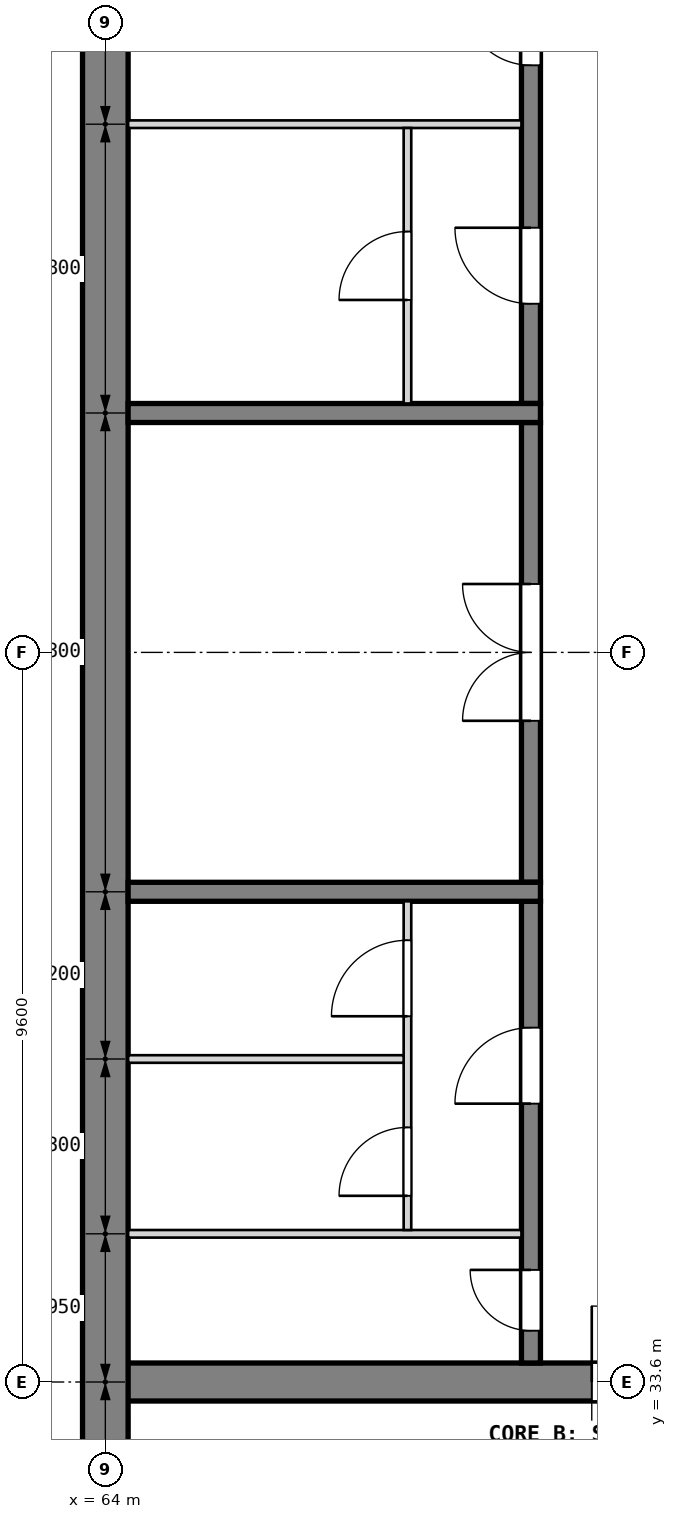
"""IFC4 building model, lengths in metres.
Left out: names, types, materials, properties, quantities, classifications, styles, units other than length and angle.
Written with IfcOpenShell. Run it as: python <this file> out.ifc"""

import sys

from ifc_helpers import new_model, si_unit, direction, frame, frame_2d, origin, place, context, subcontext, project, spatial, rectangle, extrude, element, fill, save


model = new_model("IFC4")
c1 = context("Model", 3, precision=1e-05, world=origin(), true_north=direction((0.0, 1.0)))
c2 = subcontext(c1, "Body", "Model", "MODEL_VIEW")
j1 = project(units=[si_unit("LENGTHUNIT", "METRE"), si_unit("PLANEANGLEUNIT", "RADIAN")], contexts=[c1])
p1 = place(None, origin())
s1 = spatial("IfcSite", under=j1, at=p1, CompositionType="ELEMENT")
p2 = place(p1, origin())
s2 = spatial("IfcBuilding", under=s1, at=p2, CompositionType="ELEMENT")
p3 = place(p2, frame((0.0, 0.0, 4.2)))
s3 = spatial("IfcBuildingStorey", under=s2, at=p3, CompositionType="ELEMENT", Elevation=4.2)
p4 = place(p3, frame((63.75, 33.6, 0.0), z_axis=(0.0, 0.0, 1.0), x_axis=(1.0, 0.0, 0.0)))
e1 = element("IfcWall", 1, at=p4, inside=s3, PredefinedType="SHEAR", context=c2, shape_type="SweptSolid", body=[
    extrude(rectangle(XDim=13.3, YDim=0.5, at=frame_2d((6.65, 0.0))), origin(), (0.0, 0.0, 1.0), 4.2),
])
p5 = place(p4, frame((6.65, 0.0, 0.0)))
e2 = element("IfcOpeningElement", 2, at=p5, cuts=e1, PredefinedType="OPENING", context=c2, shape_type="SweptSolid", body=[
    extrude(rectangle(XDim=2.0, YDim=2.1, at=frame_2d((1.0, 1.05))), frame((0.0, 0.26, 0.0), z_axis=(0.0, -1.0, 0.0), x_axis=(1.0, 0.0, 0.0)), (0.0, 0.0, 1.0), 0.52),
])
p6 = place(p3, frame((64.0, 28.8, 0.0), z_axis=(0.0, 0.0, 1.0), x_axis=(0.0, 1.0, 0.0)))
e3 = element("IfcWall", 3, at=p6, inside=s3, PredefinedType="SHEAR", context=c2, shape_type="SweptSolid", body=[
    extrude(rectangle(XDim=28.8, YDim=0.6, at=frame_2d((14.4, 0.0))), origin(), (0.0, 0.0, 1.0), 4.2),
])
p7 = place(p3, frame((69.6, 33.85, 0.0), z_axis=(0.0, 0.0, 1.0), x_axis=(0.0, 1.0, 0.0)))
e4 = element("IfcWall", 4, at=p7, inside=s3, PredefinedType="SOLIDWALL", context=c2, shape_type="SweptSolid", body=[
    extrude(rectangle(XDim=6.075, YDim=0.25, at=frame_2d((3.038, 0.0))), origin(), (0.0, 0.0, 1.0), 3.9),
])
p8 = place(p7, frame((0.425, 0.0, 0.0)))
e5 = element("IfcOpeningElement", 5, at=p8, cuts=e4, PredefinedType="OPENING", context=c2, shape_type="SweptSolid", body=[
    extrude(rectangle(XDim=0.8, YDim=2.1, at=frame_2d((0.4, 1.05))), frame((0.0, 0.135, 0.0), z_axis=(0.0, -1.0, 0.0), x_axis=(1.0, 0.0, 0.0)), (0.0, 0.0, 1.0), 0.27),
])
p9 = place(p7, frame((3.413, 0.0, 0.0)))
e6 = element("IfcOpeningElement", 6, at=p9, cuts=e4, PredefinedType="OPENING", context=c2, shape_type="SweptSolid", body=[
    extrude(rectangle(XDim=1.0, YDim=2.1, at=frame_2d((0.5, 1.05))), frame((0.0, 0.135, 0.0), z_axis=(0.0, -1.0, 0.0), x_axis=(1.0, 0.0, 0.0)), (0.0, 0.0, 1.0), 0.27),
])
p10 = place(p3, frame((69.6, 40.175, 0.0), z_axis=(0.0, 0.0, 1.0), x_axis=(0.0, 1.0, 0.0)))
e7 = element("IfcWall", 7, at=p10, inside=s3, PredefinedType="SOLIDWALL", context=c2, shape_type="SweptSolid", body=[
    extrude(rectangle(XDim=6.05, YDim=0.25, at=frame_2d((3.025, 0.0))), origin(), (0.0, 0.0, 1.0), 3.9),
])
p11 = place(p10, frame((2.125, 0.0, 0.0)))
e8 = element("IfcOpeningElement", 8, at=p11, cuts=e7, PredefinedType="OPENING", context=c2, shape_type="SweptSolid", body=[
    extrude(rectangle(XDim=1.8, YDim=2.1, at=frame_2d((0.9, 1.05))), frame((0.0, 0.135, 0.0), z_axis=(0.0, -1.0, 0.0), x_axis=(1.0, 0.0, 0.0)), (0.0, 0.0, 1.0), 0.27),
])
p12 = place(p3, frame((69.6, 46.475, 0.0), z_axis=(0.0, 0.0, 1.0), x_axis=(0.0, 1.0, 0.0)))
e9 = element("IfcWall", 9, at=p12, inside=s3, PredefinedType="SOLIDWALL", context=c2, shape_type="SweptSolid", body=[
    extrude(rectangle(XDim=6.075, YDim=0.25, at=frame_2d((3.038, 0.0))), origin(), (0.0, 0.0, 1.0), 3.9),
])
p13 = place(p12, frame((1.312, 0.0, 0.0)))
e10 = element("IfcOpeningElement", 10, at=p13, cuts=e9, PredefinedType="OPENING", context=c2, shape_type="SweptSolid", body=[
    extrude(rectangle(XDim=1.0, YDim=2.1, at=frame_2d((0.5, 1.05))), frame((0.0, 0.135, 0.0), z_axis=(0.0, -1.0, 0.0), x_axis=(1.0, 0.0, 0.0)), (0.0, 0.0, 1.0), 0.27),
])
p14 = place(p12, frame((4.45, 0.0, 0.0)))
e11 = element("IfcOpeningElement", 11, at=p14, cuts=e9, PredefinedType="OPENING", context=c2, shape_type="SweptSolid", body=[
    extrude(rectangle(XDim=0.9, YDim=2.1, at=frame_2d((0.45, 1.05))), frame((0.0, 0.135, 0.0), z_axis=(0.0, -1.0, 0.0), x_axis=(1.0, 0.0, 0.0)), (0.0, 0.0, 1.0), 0.27),
])
for number, where, z_axis, x_axis in (
    (12, (69.725, 40.05, 0.0), (0.0, 0.0, 1.0), (-1.0, 0.0, 0.0)),
    (13, (69.725, 46.35, 0.0), (0.0, 0.0, 1.0), (-1.0, 0.0, 0.0)),
):
    element("IfcWall", number, at=place(p3, frame(where, z_axis=z_axis, x_axis=x_axis)), inside=s3, PredefinedType="SOLIDWALL", context=c2, shape_type="SweptSolid", body=[
        extrude(rectangle(XDim=5.425, YDim=0.25, at=frame_2d((2.712, 0.0))), origin(), (0.0, 0.0, 1.0), 3.9),
    ])
p15 = place(p3, frame((69.475, 35.55, 0.0), z_axis=(0.0, 0.0, 1.0), x_axis=(-1.0, 0.0, 0.0)))
e14 = element("IfcWall", 14, at=p15, inside=s3, PredefinedType="PARTITIONING", context=c2, shape_type="SweptSolid", body=[
    extrude(rectangle(XDim=5.175, YDim=0.1, at=frame_2d((2.587, 0.0))), origin(), (0.0, 0.0, 1.0), 3.9),
])
p16 = place(p3, frame((67.975, 35.6, 0.0), z_axis=(0.0, 0.0, 1.0), x_axis=(0.0, 1.0, 0.0)))
e15 = element("IfcWall", 15, at=p16, inside=s3, PredefinedType="PARTITIONING", context=c2, shape_type="SweptSolid", body=[
    extrude(rectangle(XDim=4.325, YDim=0.1, at=frame_2d((2.163, 0.0))), origin(), (0.0, 0.0, 1.0), 3.9),
])
p17 = place(p16, frame((0.45, 0.0, 0.0)))
e16 = element("IfcOpeningElement", 16, at=p17, cuts=e15, PredefinedType="OPENING", context=c2, shape_type="SweptSolid", body=[
    extrude(rectangle(XDim=0.9, YDim=2.1, at=frame_2d((0.45, 1.05))), frame((0.0, 0.06, 0.0), z_axis=(0.0, -1.0, 0.0), x_axis=(1.0, 0.0, 0.0)), (0.0, 0.0, 1.0), 0.12),
])
p18 = place(p16, frame((2.812, 0.0, 0.0)))
e17 = element("IfcOpeningElement", 17, at=p18, cuts=e15, PredefinedType="OPENING", context=c2, shape_type="SweptSolid", body=[
    extrude(rectangle(XDim=1.0, YDim=2.1, at=frame_2d((0.5, 1.05))), frame((0.0, 0.06, 0.0), z_axis=(0.0, -1.0, 0.0), x_axis=(1.0, 0.0, 0.0)), (0.0, 0.0, 1.0), 0.12),
])
p19 = place(p3, frame((67.925, 37.85, 0.0), z_axis=(0.0, 0.0, 1.0), x_axis=(-1.0, 0.0, 0.0)))
e18 = element("IfcWall", 18, at=p19, inside=s3, PredefinedType="PARTITIONING", context=c2, shape_type="SweptSolid", body=[
    extrude(rectangle(XDim=3.625, YDim=0.1, at=frame_2d((1.812, 0.0))), origin(), (0.0, 0.0, 1.0), 3.9),
])
p20 = place(p3, frame((69.475, 50.15, 0.0), z_axis=(0.0, 0.0, 1.0), x_axis=(-1.0, 0.0, 0.0)))
e19 = element("IfcWall", 19, at=p20, inside=s3, PredefinedType="PARTITIONING", context=c2, shape_type="SweptSolid", body=[
    extrude(rectangle(XDim=5.175, YDim=0.1, at=frame_2d((2.587, 0.0))), origin(), (0.0, 0.0, 1.0), 3.9),
])
p21 = place(p3, frame((67.975, 46.475, 0.0), z_axis=(0.0, 0.0, 1.0), x_axis=(0.0, 1.0, 0.0)))
e20 = element("IfcWall", 20, at=p21, inside=s3, PredefinedType="PARTITIONING", context=c2, shape_type="SweptSolid", body=[
    extrude(rectangle(XDim=3.625, YDim=0.1, at=frame_2d((1.812, 0.0))), origin(), (0.0, 0.0, 1.0), 3.9),
])
p22 = place(p21, frame((1.363, 0.0, 0.0)))
e21 = element("IfcOpeningElement", 21, at=p22, cuts=e20, PredefinedType="OPENING", context=c2, shape_type="SweptSolid", body=[
    extrude(rectangle(XDim=0.9, YDim=2.1, at=frame_2d((0.45, 1.05))), frame((0.0, 0.06, 0.0), z_axis=(0.0, -1.0, 0.0), x_axis=(1.0, 0.0, 0.0)), (0.0, 0.0, 1.0), 0.12),
])
p23 = place(p11, origin())
e22 = element("IfcDoor", 22, at=p23, inside=s3, OperationType="DOUBLE_DOOR_SINGLE_SWING", PredefinedType="DOOR", context=c2, shape_type="SweptSolid", body=[
    extrude(rectangle(XDim=1.8, YDim=2.1, at=frame_2d((0.9, 1.05))), frame((0.0, 0.025, 0.0), z_axis=(0.0, -1.0, 0.0), x_axis=(1.0, 0.0, 0.0)), (0.0, 0.0, 1.0), 0.05),
])
fill(e8, e22)
p24 = place(p8, origin())
e23 = element("IfcDoor", 23, at=p24, inside=s3, OperationType="SINGLE_SWING_RIGHT", PredefinedType="DOOR", context=c2, shape_type="SweptSolid", body=[
    extrude(rectangle(XDim=0.8, YDim=2.1, at=frame_2d((0.4, 1.05))), frame((0.0, 0.025, 0.0), z_axis=(0.0, -1.0, 0.0), x_axis=(1.0, 0.0, 0.0)), (0.0, 0.0, 1.0), 0.05),
])
fill(e5, e23)
p25 = place(p9, origin())
e24 = element("IfcDoor", 24, at=p25, inside=s3, OperationType="SINGLE_SWING_LEFT", PredefinedType="DOOR", context=c2, shape_type="SweptSolid", body=[
    extrude(rectangle(XDim=1.0, YDim=2.1, at=frame_2d((0.5, 1.05))), frame((0.0, 0.025, 0.0), z_axis=(0.0, -1.0, 0.0), x_axis=(1.0, 0.0, 0.0)), (0.0, 0.0, 1.0), 0.05),
])
fill(e6, e24)
p26 = place(p17, origin())
e25 = element("IfcDoor", 25, at=p26, inside=s3, OperationType="SINGLE_SWING_LEFT", PredefinedType="DOOR", context=c2, shape_type="SweptSolid", body=[
    extrude(rectangle(XDim=0.9, YDim=2.1, at=frame_2d((0.45, 1.05))), frame((0.0, 0.025, 0.0), z_axis=(0.0, -1.0, 0.0), x_axis=(1.0, 0.0, 0.0)), (0.0, 0.0, 1.0), 0.05),
])
fill(e16, e25)
p27 = place(p18, origin())
e26 = element("IfcDoor", 26, at=p27, inside=s3, OperationType="SINGLE_SWING_LEFT", PredefinedType="DOOR", context=c2, shape_type="SweptSolid", body=[
    extrude(rectangle(XDim=1.0, YDim=2.1, at=frame_2d((0.5, 1.05))), frame((0.0, 0.025, 0.0), z_axis=(0.0, -1.0, 0.0), x_axis=(1.0, 0.0, 0.0)), (0.0, 0.0, 1.0), 0.05),
])
fill(e17, e26)
p28 = place(p13, origin())
e27 = element("IfcDoor", 27, at=p28, inside=s3, OperationType="SINGLE_SWING_RIGHT", PredefinedType="DOOR", context=c2, shape_type="SweptSolid", body=[
    extrude(rectangle(XDim=1.0, YDim=2.1, at=frame_2d((0.5, 1.05))), frame((0.0, 0.025, 0.0), z_axis=(0.0, -1.0, 0.0), x_axis=(1.0, 0.0, 0.0)), (0.0, 0.0, 1.0), 0.05),
])
fill(e10, e27)
p29 = place(p22, origin())
e28 = element("IfcDoor", 28, at=p29, inside=s3, OperationType="SINGLE_SWING_LEFT", PredefinedType="DOOR", context=c2, shape_type="SweptSolid", body=[
    extrude(rectangle(XDim=0.9, YDim=2.1, at=frame_2d((0.45, 1.05))), frame((0.0, 0.025, 0.0), z_axis=(0.0, -1.0, 0.0), x_axis=(1.0, 0.0, 0.0)), (0.0, 0.0, 1.0), 0.05),
])
fill(e21, e28)
p30 = place(p14, origin())
e29 = element("IfcDoor", 29, at=p30, inside=s3, OperationType="SINGLE_SWING_RIGHT", PredefinedType="DOOR", context=c2, shape_type="SweptSolid", body=[
    extrude(rectangle(XDim=0.9, YDim=2.1, at=frame_2d((0.45, 1.05))), frame((0.0, 0.025, 0.0), z_axis=(0.0, -1.0, 0.0), x_axis=(1.0, 0.0, 0.0)), (0.0, 0.0, 1.0), 0.05),
])
fill(e11, e29)
p31 = place(p5, origin())
e30 = element("IfcDoor", 30, at=p31, inside=s3, OperationType="DOUBLE_DOOR_SINGLE_SWING", PredefinedType="DOOR", context=c2, shape_type="SweptSolid", body=[
    extrude(rectangle(XDim=2.0, YDim=2.1, at=frame_2d((1.0, 1.05))), frame((0.0, 0.025, 0.0), z_axis=(0.0, -1.0, 0.0), x_axis=(1.0, 0.0, 0.0)), (0.0, 0.0, 1.0), 0.05),
])
fill(e2, e30)
save(model, sys.argv[1])
